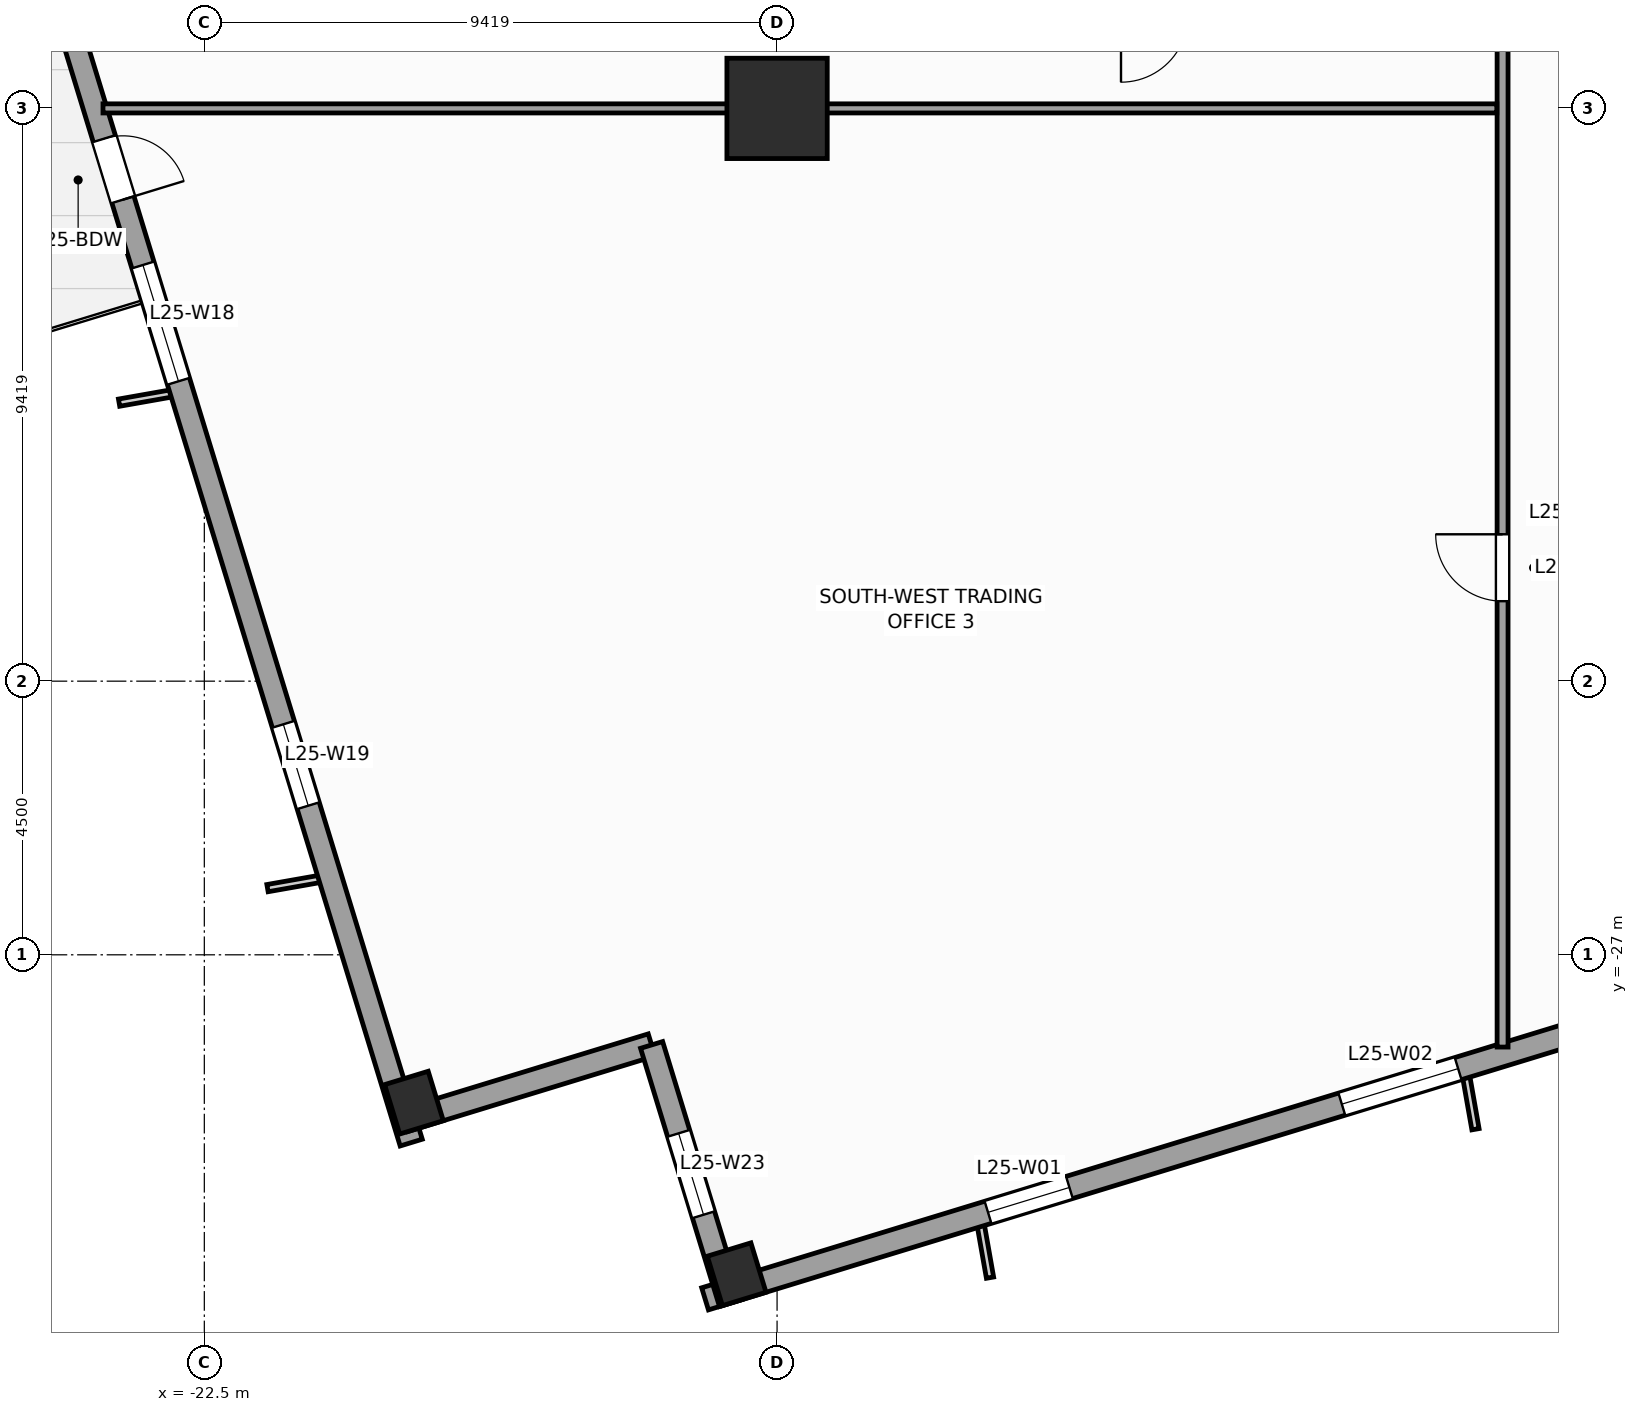
"""IFC4 building model, lengths in metres.
Left out: names, types, materials, properties, quantities, classifications, styles, units other than length and angle.
Written with IfcOpenShell. Run it as: python <this file> out.ifc"""

import sys

from ifc_helpers import new_model, si_unit, direction, frame, frame_2d, origin, origin_2d, place, context, subcontext, project, spatial, rectangle, extrude, source, transform, mapped, element, fill, save


model = new_model("IFC4")
c1 = context("Model", 3, precision=1e-05, world=origin(), true_north=direction((0.0, 1.0)))
c2 = subcontext(c1, "Body", "Model", "MODEL_VIEW")
j1 = project(units=[si_unit("LENGTHUNIT", "METRE"), si_unit("PLANEANGLEUNIT", "RADIAN")], contexts=[c1])
p1 = place(None, origin())
s1 = spatial("IfcSite", under=j1, at=p1, CompositionType="ELEMENT")
p2 = place(p1, origin())
s2 = spatial("IfcBuilding", under=s1, at=p2, CompositionType="ELEMENT")
p3 = place(p2, frame((0.0, 0.0, 107.2)))
s3 = spatial("IfcBuildingStorey", under=s2, at=p3, CompositionType="ELEMENT", Elevation=107.2)
m1 = source(origin(), c2, "Body", "SweptSolid", [
    extrude(rectangle(XDim=1.65, YDim=1.65, at=origin_2d()), origin(), (0.0, 0.0, 1.0), 4.0),
])
p4 = place(p3, frame((-13.081, -13.081, 0.0), z_axis=(0.0, 0.0, 1.0), x_axis=(1.0, 0.0, 0.0)))
e1 = element("IfcColumn", 1, at=p4, inside=s3, PredefinedType="COLUMN", context=c2, shape_type="MappedRepresentation", body=[
    mapped(m1, transform((0.0, 0.0, 0.0), scale=1.0)),
])
m2 = source(origin(), c2, "Body", "SweptSolid", [
    extrude(rectangle(XDim=0.75, YDim=0.85, at=origin_2d()), origin(), (0.0, 0.0, 1.0), 4.0),
])
for number, where, z_axis, x_axis in (
    (2, (-13.746, -32.253, 0.0), (0.0, 0.0, 1.0), (0.956, 0.292, 0.0)),
    (3, (-19.052, -29.431, 0.0), (0.0, 0.0, 1.0), (0.956, 0.292, 0.0)),
):
    element("IfcColumn", number, at=place(p3, frame(where, z_axis=z_axis, x_axis=x_axis)), inside=s3, PredefinedType="COLUMN", context=c2, shape_type="MappedRepresentation", body=[
        mapped(m2, transform((0.0, 0.0, 0.0), scale=1.0)),
    ])
p5 = place(p3, frame((-14.265, -32.658, 0.0), z_axis=(0.0, 0.0, 1.0), x_axis=(0.956304320851, 0.292373127906, 0.0)))
e4 = element("IfcWall", 4, at=p5, inside=s3, PredefinedType="STANDARD", context=c2, shape_type="SweptSolid", body=[
    extrude(rectangle(XDim=46.38, YDim=0.38, at=frame_2d((23.19, 0.0))), origin(), (0.0, 0.0, 1.0), 3.14),
])
p6 = place(p5, frame((4.865, 0.0, 0.51)))
e5 = element("IfcOpeningElement", 5, at=p6, cuts=e4, PredefinedType="OPENING", context=c2, shape_type="SweptSolid", body=[
    extrude(rectangle(XDim=1.4, YDim=2.4, at=frame_2d((0.7, 1.2))), frame((0.0, 0.2, 0.0), z_axis=(0.0, -1.0, 0.0), x_axis=(1.0, 0.0, 0.0)), (0.0, 0.0, 1.0), 0.4),
])
p7 = place(p5, frame((10.95, 0.0, 0.51)))
e6 = element("IfcOpeningElement", 6, at=p7, cuts=e4, PredefinedType="OPENING", context=c2, shape_type="SweptSolid", body=[
    extrude(rectangle(XDim=2.0, YDim=2.4, at=frame_2d((1.0, 1.2))), frame((0.0, 0.2, 0.0), z_axis=(0.0, -1.0, 0.0), x_axis=(1.0, 0.0, 0.0)), (0.0, 0.0, 1.0), 0.4),
])
p8 = place(p5, frame((20.512, 0.0, 0.51)))
e7 = element("IfcOpeningElement", 7, at=p8, cuts=e4, PredefinedType="OPENING", context=c2, shape_type="SweptSolid", body=[
    extrude(rectangle(XDim=2.0, YDim=2.4, at=frame_2d((1.0, 1.2))), frame((0.0, 0.2, 0.0), z_axis=(0.0, -1.0, 0.0), x_axis=(1.0, 0.0, 0.0)), (0.0, 0.0, 1.0), 0.4),
])
p9 = place(p5, frame((30.538, 0.0, 0.51)))
e8 = element("IfcOpeningElement", 8, at=p9, cuts=e4, PredefinedType="OPENING", context=c2, shape_type="SweptSolid", body=[
    extrude(rectangle(XDim=2.0, YDim=2.4, at=frame_2d((1.0, 1.2))), frame((0.0, 0.2, 0.0), z_axis=(0.0, -1.0, 0.0), x_axis=(1.0, 0.0, 0.0)), (0.0, 0.0, 1.0), 0.4),
])
p10 = place(p5, frame((39.187, 0.0, 0.51)))
e9 = element("IfcOpeningElement", 9, at=p10, cuts=e4, PredefinedType="OPENING", context=c2, shape_type="SweptSolid", body=[
    extrude(rectangle(XDim=1.4, YDim=2.4, at=frame_2d((0.7, 1.2))), frame((0.0, 0.2, 0.0), z_axis=(0.0, -1.0, 0.0), x_axis=(1.0, 0.0, 0.0)), (0.0, 0.0, 1.0), 0.4),
])
p11 = place(p3, frame((-32.658, 14.265, 0.0), z_axis=(0.0, 0.0, 1.0), x_axis=(0.292373127906, -0.956304320851, 0.0)))
e10 = element("IfcWall", 10, at=p11, inside=s3, PredefinedType="STANDARD", context=c2, shape_type="SweptSolid", body=[
    extrude(rectangle(XDim=46.38, YDim=0.38, at=frame_2d((23.19, 0.0))), origin(), (0.0, 0.0, 1.0), 3.14),
])
p12 = place(p11, frame((29.115, 0.0, 0.0)))
e11 = element("IfcOpeningElement", 11, at=p12, cuts=e10, PredefinedType="OPENING", context=c2, shape_type="SweptSolid", body=[
    extrude(rectangle(XDim=1.05, YDim=2.25, at=frame_2d((0.525, 1.125))), frame((0.0, 0.2, 0.0), z_axis=(0.0, -1.0, 0.0), x_axis=(1.0, 0.0, 0.0)), (0.0, 0.0, 1.0), 0.4),
])
p13 = place(p11, frame((4.865, 0.0, 0.51)))
e12 = element("IfcOpeningElement", 12, at=p13, cuts=e10, PredefinedType="OPENING", context=c2, shape_type="SweptSolid", body=[
    extrude(rectangle(XDim=1.4, YDim=2.4, at=frame_2d((0.7, 1.2))), frame((0.0, 0.2, 0.0), z_axis=(0.0, -1.0, 0.0), x_axis=(1.0, 0.0, 0.0)), (0.0, 0.0, 1.0), 0.4),
])
p14 = place(p11, frame((14.7, 0.0, 0.51)))
e13 = element("IfcOpeningElement", 13, at=p14, cuts=e10, PredefinedType="OPENING", context=c2, shape_type="SweptSolid", body=[
    extrude(rectangle(XDim=2.0, YDim=2.4, at=frame_2d((1.0, 1.2))), frame((0.0, 0.2, 0.0), z_axis=(0.0, -1.0, 0.0), x_axis=(1.0, 0.0, 0.0)), (0.0, 0.0, 1.0), 0.4),
])
p15 = place(p11, frame((19.012, 0.0, 0.51)))
e14 = element("IfcOpeningElement", 14, at=p15, cuts=e10, PredefinedType="OPENING", context=c2, shape_type="SweptSolid", body=[
    extrude(rectangle(XDim=2.0, YDim=2.4, at=frame_2d((1.0, 1.2))), frame((0.0, 0.2, 0.0), z_axis=(0.0, -1.0, 0.0), x_axis=(1.0, 0.0, 0.0)), (0.0, 0.0, 1.0), 0.4),
])
p16 = place(p11, frame((31.288, 0.0, 0.51)))
e15 = element("IfcOpeningElement", 15, at=p16, cuts=e10, PredefinedType="OPENING", context=c2, shape_type="SweptSolid", body=[
    extrude(rectangle(XDim=2.0, YDim=2.4, at=frame_2d((1.0, 1.2))), frame((0.0, 0.2, 0.0), z_axis=(0.0, -1.0, 0.0), x_axis=(1.0, 0.0, 0.0)), (0.0, 0.0, 1.0), 0.4),
])
p17 = place(p11, frame((39.187, 0.0, 0.51)))
e16 = element("IfcOpeningElement", 16, at=p17, cuts=e10, PredefinedType="OPENING", context=c2, shape_type="SweptSolid", body=[
    extrude(rectangle(XDim=1.4, YDim=2.4, at=frame_2d((0.7, 1.2))), frame((0.0, 0.2, 0.0), z_axis=(0.0, -1.0, 0.0), x_axis=(1.0, 0.0, 0.0)), (0.0, 0.0, 1.0), 0.4),
])
p18 = place(p3, frame((-19.208, -29.725, 0.0), z_axis=(0.0, 0.0, 1.0), x_axis=(0.956312764915, 0.292345507338, 0.0)))
e17 = element("IfcWall", 17, at=p18, inside=s3, PredefinedType="STANDARD", context=c2, shape_type="SweptSolid", body=[
    extrude(rectangle(XDim=4.25, YDim=0.38, at=frame_2d((2.125, 0.0))), origin(), (0.0, 0.0, 1.0), 3.74),
])
p19 = place(p3, frame((-15.144, -28.482, 0.0), z_axis=(0.0, 0.0, 1.0), x_axis=(0.292373601522, -0.956304176051, 0.0)))
e18 = element("IfcWall", 18, at=p19, inside=s3, PredefinedType="STANDARD", context=c2, shape_type="SweptSolid", body=[
    extrude(rectangle(XDim=4.44, YDim=0.38, at=frame_2d((2.22, 0.0))), origin(), (0.0, 0.0, 1.0), 3.04),
])
p20 = place(p19, frame((1.52, 0.0, 0.51)))
e19 = element("IfcOpeningElement", 19, at=p20, cuts=e18, PredefinedType="OPENING", context=c2, shape_type="SweptSolid", body=[
    extrude(rectangle(XDim=1.4, YDim=2.4, at=frame_2d((0.7, 1.2))), frame((0.0, 0.2, 0.0), z_axis=(0.0, -1.0, 0.0), x_axis=(1.0, 0.0, 0.0)), (0.0, 0.0, 1.0), 0.4),
])
p21 = place(p3, frame((-1.15, -28.517, 0.0), z_axis=(0.0, 0.0, 1.0), x_axis=(0.0, 1.0, 0.0)))
e20 = element("IfcWall", 20, at=p21, inside=s3, PredefinedType="PARTITIONING", context=c2, shape_type="SweptSolid", body=[
    extrude(rectangle(XDim=16.867, YDim=0.18, at=frame_2d((8.434, 0.0))), origin(), (0.0, 0.0, 1.0), 3.74),
])
p22 = place(p21, frame((7.333, 0.0, 0.0)))
e21 = element("IfcOpeningElement", 21, at=p22, cuts=e20, PredefinedType="OPENING", context=c2, shape_type="SweptSolid", body=[
    extrude(rectangle(XDim=1.1, YDim=2.2, at=frame_2d((0.55, 1.1))), frame((0.0, 0.1, 0.0), z_axis=(0.0, -1.0, 0.0), x_axis=(1.0, 0.0, 0.0)), (0.0, 0.0, 1.0), 0.2),
])
p23 = place(p3, frame((-24.167, -13.081, 0.0), z_axis=(0.0, 0.0, 1.0), x_axis=(1.0, 0.0, 0.0)))
e22 = element("IfcWall", 22, at=p23, inside=s3, PredefinedType="PARTITIONING", context=c2, shape_type="SweptSolid", body=[
    extrude(rectangle(XDim=22.921, YDim=0.15, at=frame_2d((11.461, 0.0))), origin(), (0.0, 0.0, 1.0), 2.732),
])
m3 = source(origin(), c2, "Body", "SweptSolid", [
    extrude(rectangle(XDim=1.4, YDim=2.4, at=frame_2d((0.7, 1.2))), frame((0.0, 0.03, 0.0), z_axis=(0.0, -1.0, 0.0), x_axis=(1.0, 0.0, 0.0)), (0.0, 0.0, 1.0), 0.06),
])
p24 = place(p6, origin())
e23 = element("IfcWindow", 23, at=p24, inside=s3, PartitioningType="SINGLE_PANEL", PredefinedType="WINDOW", context=c2, shape_type="MappedRepresentation", body=[
    mapped(m3, transform((0.0, 0.0, 0.0), scale=1.0)),
])
fill(e5, e23)
m4 = source(origin(), c2, "Body", "SweptSolid", [
    extrude(rectangle(XDim=2.0, YDim=2.4, at=frame_2d((1.0, 1.2))), frame((0.0, 0.03, 0.0), z_axis=(0.0, -1.0, 0.0), x_axis=(1.0, 0.0, 0.0)), (0.0, 0.0, 1.0), 0.06),
])
p25 = place(p7, origin())
e24 = element("IfcWindow", 24, at=p25, inside=s3, PartitioningType="SINGLE_PANEL", PredefinedType="WINDOW", context=c2, shape_type="MappedRepresentation", body=[
    mapped(m4, transform((0.0, 0.0, 0.0), scale=1.0)),
])
fill(e6, e24)
m5 = source(origin(), c2, "Body", "SweptSolid", [
    extrude(rectangle(XDim=1.05, YDim=2.25, at=frame_2d((0.525, 1.125))), frame((0.0, 0.025, 0.0), z_axis=(0.0, -1.0, 0.0), x_axis=(1.0, 0.0, 0.0)), (0.0, 0.0, 1.0), 0.05),
])
p26 = place(p12, origin())
e25 = element("IfcDoor", 25, at=p26, inside=s3, OperationType="SINGLE_SWING_RIGHT", PredefinedType="DOOR", context=c2, shape_type="MappedRepresentation", body=[
    mapped(m5, transform((0.0, 0.0, 0.0), scale=1.0)),
])
fill(e11, e25)
p27 = place(p16, origin())
e26 = element("IfcWindow", 26, at=p27, inside=s3, PartitioningType="SINGLE_PANEL", PredefinedType="WINDOW", context=c2, shape_type="MappedRepresentation", body=[
    mapped(m4, transform((0.0, 0.0, 0.0), scale=1.0)),
])
fill(e15, e26)
p28 = place(p17, origin())
e27 = element("IfcWindow", 27, at=p28, inside=s3, PartitioningType="SINGLE_PANEL", PredefinedType="WINDOW", context=c2, shape_type="MappedRepresentation", body=[
    mapped(m3, transform((0.0, 0.0, 0.0), scale=1.0)),
])
fill(e16, e27)
p29 = place(p20, origin())
e28 = element("IfcWindow", 28, at=p29, inside=s3, PartitioningType="SINGLE_PANEL", PredefinedType="WINDOW", context=c2, shape_type="MappedRepresentation", body=[
    mapped(m3, transform((0.0, 0.0, 0.0), scale=1.0)),
])
fill(e19, e28)
m6 = source(origin(), c2, "Body", "SweptSolid", [
    extrude(rectangle(XDim=1.1, YDim=2.2, at=frame_2d((0.55, 1.1))), frame((0.0, 0.025, 0.0), z_axis=(0.0, -1.0, 0.0), x_axis=(1.0, 0.0, 0.0)), (0.0, 0.0, 1.0), 0.05),
])
p30 = place(p22, origin())
e29 = element("IfcDoor", 29, at=p30, inside=s3, OperationType="SINGLE_SWING_RIGHT", PredefinedType="DOOR", context=c2, shape_type="MappedRepresentation", body=[
    mapped(m6, transform((0.0, 0.0, 0.0), scale=1.0)),
])
fill(e21, e29)
save(model, sys.argv[1])
